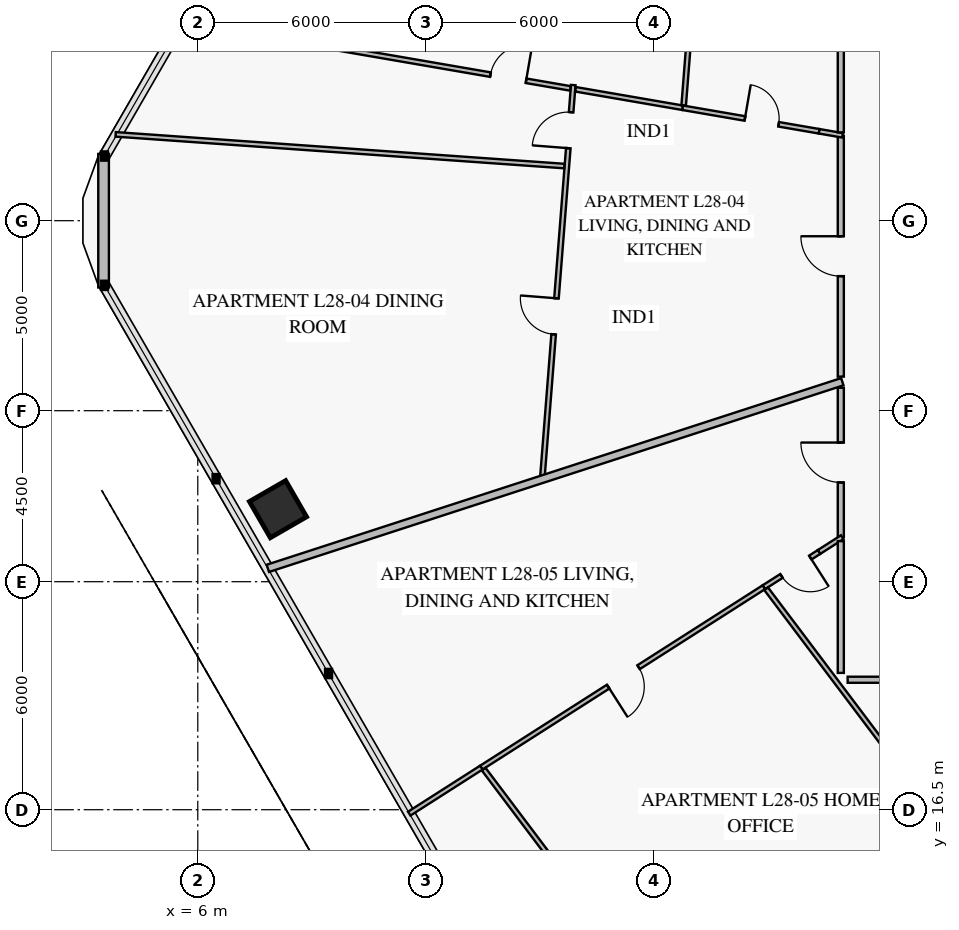
"""IFC4 building model, lengths in metres.
Left out: names, types, materials, properties, quantities, classifications, styles, units other than length and angle.
Written with IfcOpenShell. Run it as: python <this file> out.ifc"""

import sys

from ifc_helpers import new_model, si_unit, direction, frame, frame_2d, origin, origin_2d, place, context, subcontext, project, spatial, rectangle, extrude, element, fill, save


model = new_model("IFC4")
c1 = context("Model", 3, precision=1e-05, world=origin(), true_north=direction((0.0, 1.0)))
c2 = subcontext(c1, "Body", "Model", "MODEL_VIEW")
j1 = project(units=[si_unit("LENGTHUNIT", "METRE"), si_unit("PLANEANGLEUNIT", "RADIAN")], contexts=[c1])
p1 = place(None, origin())
s1 = spatial("IfcSite", under=j1, at=p1, CompositionType="ELEMENT")
p2 = place(p1, origin())
s2 = spatial("IfcBuilding", under=s1, at=p2, CompositionType="ELEMENT")
p3 = place(p2, frame((0.0, 0.0, 115.2)))
s3 = spatial("IfcBuildingStorey", under=s2, at=p3, CompositionType="ELEMENT", Elevation=115.2)
p4 = place(p3, frame((8.111, 24.408, 0.0), z_axis=(0.0, 0.0, 1.0), x_axis=(0.5, -0.866025403784, 0.0)))
e1 = element("IfcColumn", 1, at=p4, inside=s3, PredefinedType="COLUMN", context=c2, shape_type="SweptSolid", body=[
    extrude(rectangle(XDim=1.1, YDim=1.1, at=origin_2d()), origin(), (0.0, 0.0, 1.0), 3.55),
])
p5 = place(p3, frame((3.521, 30.242, 0.0), z_axis=(0.0, 0.0, 1.0), x_axis=(0.0, 1.0, 0.0)))
e2 = element("IfcWall", 2, at=p5, inside=s3, PredefinedType="SOLIDWALL", context=c2, shape_type="SweptSolid", body=[
    extrude(rectangle(XDim=3.515, YDim=0.28, at=frame_2d((1.758, 0.0))), origin(), (0.0, 0.0, 1.0), 3.55),
])
p6 = place(p3, frame((15.88, 35.57, 0.0), z_axis=(0.0, 0.0, 1.0), x_axis=(-0.078466415581, -0.996916757621, 0.0)))
e3 = element("IfcWall", 3, at=p6, inside=s3, PredefinedType="PARTITIONING", context=c2, shape_type="SweptSolid", body=[
    extrude(rectangle(XDim=10.305, YDim=0.12, at=frame_2d((5.152, 0.0))), origin(), (0.0, 0.0, 1.0), 2.85),
])
p7 = place(p6, frame((0.717, 0.0, 0.0)))
e4 = element("IfcOpeningElement", 4, at=p7, cuts=e3, PredefinedType="OPENING", context=c2, shape_type="SweptSolid", body=[
    extrude(rectangle(XDim=0.95, YDim=2.1, at=frame_2d((0.475, 1.05))), frame((0.0, 0.072, 0.0), z_axis=(0.0, -1.0, 0.0), x_axis=(1.0, 0.0, 0.0)), (0.0, 0.0, 1.0), 0.144),
])
p8 = place(p6, frame((5.629, 0.0, 0.0)))
e5 = element("IfcOpeningElement", 5, at=p8, cuts=e3, PredefinedType="OPENING", context=c2, shape_type="SweptSolid", body=[
    extrude(rectangle(XDim=0.95, YDim=2.1, at=frame_2d((0.475, 1.05))), frame((0.0, 0.072, 0.0), z_axis=(0.0, -1.0, 0.0), x_axis=(1.0, 0.0, 0.0)), (0.0, 0.0, 1.0), 0.144),
])
p9 = place(p3, frame((22.35, 34.353, 0.0), z_axis=(0.0, 0.0, 1.0), x_axis=(-0.985463207412, 0.169888983862, 0.0)))
e6 = element("IfcWall", 6, at=p9, inside=s3, PredefinedType="PARTITIONING", context=c2, shape_type="SweptSolid", body=[
    extrude(rectangle(XDim=3.647, YDim=0.12, at=frame_2d((1.824, 0.0))), origin(), (0.0, 0.0, 1.0), 3.55),
])
p10 = place(p9, frame((1.082, 0.0, 0.0)))
e7 = element("IfcOpeningElement", 7, at=p10, cuts=e6, PredefinedType="OPENING", context=c2, shape_type="SweptSolid", body=[
    extrude(rectangle(XDim=0.9, YDim=2.1, at=frame_2d((0.45, 1.05))), frame((0.0, 0.072, 0.0), z_axis=(0.0, -1.0, 0.0), x_axis=(1.0, 0.0, 0.0)), (0.0, 0.0, 1.0), 0.144),
])
p11 = place(p3, frame((18.756, 34.972, 0.0), z_axis=(0.0, 0.0, 1.0), x_axis=(-0.985473922691, 0.169826816774, 0.0)))
e8 = element("IfcWall", 8, at=p11, inside=s3, PredefinedType="PARTITIONING", context=c2, shape_type="SweptSolid", body=[
    extrude(rectangle(XDim=2.858, YDim=0.12, at=frame_2d((1.429, 0.0))), origin(), (0.0, 0.0, 1.0), 3.1),
])
p12 = place(p3, frame((15.805, 35.481, 0.0), z_axis=(0.0, 0.0, 1.0), x_axis=(-0.985468091592, 0.169860650105, 0.0)))
e9 = element("IfcWall", 9, at=p12, inside=s3, PredefinedType="PARTITIONING", context=c2, shape_type="SweptSolid", body=[
    extrude(rectangle(XDim=6.362, YDim=0.12, at=frame_2d((3.181, 0.0))), origin(), (0.0, 0.0, 1.0), 3.55),
])
p13 = place(p12, frame((1.184, 0.0, 0.0)))
e10 = element("IfcOpeningElement", 10, at=p13, cuts=e9, PredefinedType="OPENING", context=c2, shape_type="SweptSolid", body=[
    extrude(rectangle(XDim=0.95, YDim=2.1, at=frame_2d((0.475, 1.05))), frame((0.0, 0.072, 0.0), z_axis=(0.0, -1.0, 0.0), x_axis=(1.0, 0.0, 0.0)), (0.0, 0.0, 1.0), 0.144),
])
p14 = place(p3, frame((22.92, 34.234, 0.0), z_axis=(0.0, 0.0, 1.0), x_axis=(0.0, -1.0, 0.0)))
e11 = element("IfcWall", 11, at=p14, inside=s3, PredefinedType="PARTITIONING", context=c2, shape_type="SweptSolid", body=[
    extrude(rectangle(XDim=6.337, YDim=0.16, at=frame_2d((3.169, 0.0))), origin(), (0.0, 0.0, 1.0), 2.85),
])
p15 = place(p14, frame((2.644, 0.0, 0.0)))
e12 = element("IfcOpeningElement", 12, at=p15, cuts=e11, PredefinedType="OPENING", context=c2, shape_type="SweptSolid", body=[
    extrude(rectangle(XDim=1.05, YDim=2.15, at=frame_2d((0.525, 1.075))), frame((0.0, 0.092, 0.0), z_axis=(0.0, -1.0, 0.0), x_axis=(1.0, 0.0, 0.0)), (0.0, 0.0, 1.0), 0.184),
])
p16 = place(p3, frame((22.35, 23.284, 0.0), z_axis=(0.0, 0.0, 1.0), x_axis=(-0.842804899484, -0.538219194572, 0.0)))
e13 = element("IfcWall", 13, at=p16, inside=s3, PredefinedType="PARTITIONING", context=c2, shape_type="SweptSolid", body=[
    extrude(rectangle(XDim=1.727, YDim=0.12, at=frame_2d((0.864, 0.0))), origin(), (0.0, 0.0, 1.0), 3.55),
])
p17 = place(p16, frame((0.275, 0.0, 0.0)))
e14 = element("IfcOpeningElement", 14, at=p17, cuts=e13, PredefinedType="OPENING", context=c2, shape_type="SweptSolid", body=[
    extrude(rectangle(XDim=0.9, YDim=2.1, at=frame_2d((0.45, 1.05))), frame((0.0, 0.072, 0.0), z_axis=(0.0, -1.0, 0.0), x_axis=(1.0, 0.0, 0.0)), (0.0, 0.0, 1.0), 0.144),
])
p18 = place(p3, frame((20.894, 22.354, 0.0), z_axis=(0.0, 0.0, 1.0), x_axis=(-0.842829505657, -0.538180661482, 0.0)))
e15 = element("IfcWall", 15, at=p18, inside=s3, PredefinedType="PARTITIONING", context=c2, shape_type="SweptSolid", body=[
    extrude(rectangle(XDim=8.819, YDim=0.12, at=frame_2d((4.41, 0.0))), origin(), (0.0, 0.0, 1.0), 3.1),
])
p19 = place(p18, frame((3.91, 0.0, 0.0)))
e16 = element("IfcOpeningElement", 16, at=p19, cuts=e15, PredefinedType="OPENING", context=c2, shape_type="SweptSolid", body=[
    extrude(rectangle(XDim=0.95, YDim=2.1, at=frame_2d((0.475, 1.05))), frame((0.0, 0.072, 0.0), z_axis=(0.0, -1.0, 0.0), x_axis=(1.0, 0.0, 0.0)), (0.0, 0.0, 1.0), 0.144),
])
p20 = place(p3, frame((13.523, 17.567, 0.0), z_axis=(0.0, 0.0, 1.0), x_axis=(0.601820745962, -0.798631197569, 0.0)))
e17 = element("IfcWall", 17, at=p20, inside=s3, PredefinedType="PARTITIONING", context=c2, shape_type="SweptSolid", body=[
    extrude(rectangle(XDim=11.018, YDim=0.12, at=frame_2d((5.509, 0.0))), origin(), (0.0, 0.0, 1.0), 2.8),
])
p21 = place(p20, frame((4.39, 0.0, 0.0)))
e18 = element("IfcOpeningElement", 18, at=p21, cuts=e17, PredefinedType="OPENING", context=c2, shape_type="SweptSolid", body=[
    extrude(rectangle(XDim=0.95, YDim=2.1, at=frame_2d((0.475, 1.05))), frame((0.0, 0.072, 0.0), z_axis=(0.0, -1.0, 0.0), x_axis=(1.0, 0.0, 0.0)), (0.0, 0.0, 1.0), 0.144),
])
p22 = place(p3, frame((22.92, 27.602, 0.0), z_axis=(0.0, 0.0, 1.0), x_axis=(0.0, -1.0, 0.0)))
e19 = element("IfcWall", 19, at=p22, inside=s3, PredefinedType="PARTITIONING", context=c2, shape_type="SweptSolid", body=[
    extrude(rectangle(XDim=3.931, YDim=0.16, at=frame_2d((1.965, 0.0))), origin(), (0.0, 0.0, 1.0), 3.55),
])
p23 = place(p22, frame((1.44, 0.0, 0.0)))
e20 = element("IfcOpeningElement", 20, at=p23, cuts=e19, PredefinedType="OPENING", context=c2, shape_type="SweptSolid", body=[
    extrude(rectangle(XDim=1.05, YDim=2.15, at=frame_2d((0.525, 1.075))), frame((0.0, 0.092, 0.0), z_axis=(0.0, -1.0, 0.0), x_axis=(1.0, 0.0, 0.0)), (0.0, 0.0, 1.0), 0.184),
])
p24 = place(p3, frame((15.644, 33.438, 0.0), z_axis=(0.0, 0.0, 1.0), x_axis=(-0.997515449917, 0.070448045941, 0.0)))
e21 = element("IfcWall", 21, at=p24, inside=s3, PredefinedType="PARTITIONING", context=c2, shape_type="SweptSolid", body=[
    extrude(rectangle(XDim=11.835, YDim=0.12, at=frame_2d((5.917, 0.0))), origin(), (0.0, 0.0, 1.0), 2.8),
])
p25 = place(p3, frame((22.965, 34.247, 0.0), z_axis=(0.0, 0.0, 1.0), x_axis=(-0.985457855144, 0.169920027466, 0.0)))
e22 = element("IfcWall", 22, at=p25, inside=s3, PredefinedType="PARTITIONING", context=c2, shape_type="SweptSolid", body=[
    extrude(rectangle(XDim=0.624, YDim=0.12, at=frame_2d((0.312, 0.0))), origin(), (0.0, 0.0, 1.0), 3.55),
])
p26 = place(p3, frame((19.211, 40.433, 0.0), z_axis=(0.0, 0.0, 1.0), x_axis=(-0.078465431449, -0.996916835081, 0.0)))
e23 = element("IfcWall", 23, at=p26, inside=s3, PredefinedType="PARTITIONING", context=c2, shape_type="SweptSolid", body=[
    extrude(rectangle(XDim=5.414, YDim=0.12, at=frame_2d((2.707, 0.0))), origin(), (0.0, 0.0, 1.0), 2.85),
])
p27 = place(p3, frame((22.96, 27.763, 0.0), z_axis=(0.0, 0.0, 1.0), x_axis=(-0.95105675479, -0.309016260362, 0.0)))
e24 = element("IfcWall", 24, at=p27, inside=s3, PredefinedType="PARTITIONING", context=c2, shape_type="SweptSolid", body=[
    extrude(rectangle(XDim=15.894, YDim=0.2, at=frame_2d((7.947, 0.0))), origin(), (0.0, 0.0, 1.0), 2.8),
])
p28 = place(p3, frame((22.957, 23.672, 0.0), z_axis=(0.0, 0.0, 1.0), x_axis=(-0.842837175005, -0.538168650546, 0.0)))
e25 = element("IfcWall", 25, at=p28, inside=s3, PredefinedType="PARTITIONING", context=c2, shape_type="SweptSolid", body=[
    extrude(rectangle(XDim=0.72, YDim=0.12, at=frame_2d((0.36, 0.0))), origin(), (0.0, 0.0, 1.0), 3.55),
])
p29 = place(p3, frame((13.461, 17.608, 0.0), z_axis=(0.0, 0.0, 1.0), x_axis=(-0.842820653361, -0.538194524562, 0.0)))
e26 = element("IfcWall", 26, at=p29, inside=s3, PredefinedType="PARTITIONING", context=c2, shape_type="SweptSolid", body=[
    extrude(rectangle(XDim=2.25, YDim=0.12, at=frame_2d((1.125, 0.0))), origin(), (0.0, 0.0, 1.0), 2.8),
])
p30 = place(p3, frame((20.956, 22.313, 0.0), z_axis=(0.0, 0.0, 1.0), x_axis=(0.601821242671, -0.798630823265, 0.0)))
e27 = element("IfcWall", 27, at=p30, inside=s3, PredefinedType="PARTITIONING", context=c2, shape_type="SweptSolid", body=[
    extrude(rectangle(XDim=7.393, YDim=0.12, at=frame_2d((3.697, 0.0))), origin(), (0.0, 0.0, 1.0), 2.85),
])
p31 = place(p3, frame((27.879, 19.96, 0.0), z_axis=(0.0, 0.0, 1.0), x_axis=(-0.559197020648, -0.829034795469, 0.0)))
e28 = element("IfcWall", 28, at=p31, inside=s3, PredefinedType="PARTITIONING", context=c2, shape_type="SweptSolid", body=[
    extrude(rectangle(XDim=17.696, YDim=0.2, at=frame_2d((8.848, 0.0))), origin(), (0.0, 0.0, 1.0), 2.8),
])
p32 = place(p3, frame((22.92, 38.499, 0.0), z_axis=(0.0, 0.0, 1.0), x_axis=(0.0, -1.0, 0.0)))
e29 = element("IfcWall", 29, at=p32, inside=s3, PredefinedType="PARTITIONING", context=c2, shape_type="SweptSolid", body=[
    extrude(rectangle(XDim=4.176, YDim=0.16, at=frame_2d((2.088, 0.0))), origin(), (0.0, 0.0, 1.0), 2.85),
])
p33 = place(p3, frame((23.1, 19.92, 0.0), z_axis=(0.0, 0.0, 1.0), x_axis=(1.0, 0.0, 0.0)))
e30 = element("IfcWall", 30, at=p33, inside=s3, PredefinedType="PARTITIONING", context=c2, shape_type="SweptSolid", body=[
    extrude(rectangle(XDim=4.573, YDim=0.16, at=frame_2d((2.287, 0.0))), origin(), (0.0, 0.0, 1.0), 2.85),
])
p34 = place(p3, frame((22.92, 23.567, 0.0), z_axis=(0.0, 0.0, 1.0), x_axis=(0.0, -1.0, 0.0)))
e31 = element("IfcWall", 31, at=p34, inside=s3, PredefinedType="PARTITIONING", context=c2, shape_type="SweptSolid", body=[
    extrude(rectangle(XDim=3.467, YDim=0.16, at=frame_2d((1.733, 0.0))), origin(), (0.0, 0.0, 1.0), 3.55),
])
p35 = place(p7, frame((0.95, 0.0, 0.0), z_axis=(0.0, 0.0, 1.0), x_axis=(-1.0, 0.0, 0.0)))
e32 = element("IfcDoor", 32, at=p35, inside=s3, OperationType="SINGLE_SWING_LEFT", PredefinedType="DOOR", context=c2, shape_type="SweptSolid", body=[
    extrude(rectangle(XDim=0.95, YDim=2.1, at=frame_2d((0.475, 1.05))), frame((0.0, 0.025, 0.0), z_axis=(0.0, -1.0, 0.0), x_axis=(1.0, 0.0, 0.0)), (0.0, 0.0, 1.0), 0.05),
])
fill(e4, e32)
p36 = place(p8, frame((0.95, 0.0, 0.0), z_axis=(0.0, 0.0, 1.0), x_axis=(-1.0, 0.0, 0.0)))
e33 = element("IfcDoor", 33, at=p36, inside=s3, OperationType="SINGLE_SWING_RIGHT", PredefinedType="DOOR", context=c2, shape_type="SweptSolid", body=[
    extrude(rectangle(XDim=0.95, YDim=2.1, at=frame_2d((0.475, 1.05))), frame((0.0, 0.025, 0.0), z_axis=(0.0, -1.0, 0.0), x_axis=(1.0, 0.0, 0.0)), (0.0, 0.0, 1.0), 0.05),
])
fill(e5, e33)
p37 = place(p10, frame((0.9, 0.0, 0.0), z_axis=(0.0, 0.0, 1.0), x_axis=(-1.0, 0.0, 0.0)))
e34 = element("IfcDoor", 34, at=p37, inside=s3, OperationType="SINGLE_SWING_LEFT", PredefinedType="DOOR", context=c2, shape_type="SweptSolid", body=[
    extrude(rectangle(XDim=0.9, YDim=2.1, at=frame_2d((0.45, 1.05))), frame((0.0, 0.025, 0.0), z_axis=(0.0, -1.0, 0.0), x_axis=(1.0, 0.0, 0.0)), (0.0, 0.0, 1.0), 0.05),
])
fill(e7, e34)
p38 = place(p13, frame((0.95, 0.0, 0.0), z_axis=(0.0, 0.0, 1.0), x_axis=(-1.0, 0.0, 0.0)))
e35 = element("IfcDoor", 35, at=p38, inside=s3, OperationType="SINGLE_SWING_RIGHT", PredefinedType="DOOR", context=c2, shape_type="SweptSolid", body=[
    extrude(rectangle(XDim=0.95, YDim=2.1, at=frame_2d((0.475, 1.05))), frame((0.0, 0.025, 0.0), z_axis=(0.0, -1.0, 0.0), x_axis=(1.0, 0.0, 0.0)), (0.0, 0.0, 1.0), 0.05),
])
fill(e10, e35)
p39 = place(p15, frame((1.05, 0.0, 0.0), z_axis=(0.0, 0.0, 1.0), x_axis=(-1.0, 0.0, 0.0)))
e36 = element("IfcDoor", 36, at=p39, inside=s3, OperationType="SINGLE_SWING_RIGHT", PredefinedType="DOOR", context=c2, shape_type="SweptSolid", body=[
    extrude(rectangle(XDim=1.05, YDim=2.15, at=frame_2d((0.525, 1.075))), frame((0.0, 0.025, 0.0), z_axis=(0.0, -1.0, 0.0), x_axis=(1.0, 0.0, 0.0)), (0.0, 0.0, 1.0), 0.05),
])
fill(e12, e36)
p40 = place(p17, origin())
e37 = element("IfcDoor", 37, at=p40, inside=s3, OperationType="SINGLE_SWING_LEFT", PredefinedType="DOOR", context=c2, shape_type="SweptSolid", body=[
    extrude(rectangle(XDim=0.9, YDim=2.1, at=frame_2d((0.45, 1.05))), frame((0.0, 0.025, 0.0), z_axis=(0.0, -1.0, 0.0), x_axis=(1.0, 0.0, 0.0)), (0.0, 0.0, 1.0), 0.05),
])
fill(e14, e37)
p41 = place(p19, origin())
e38 = element("IfcDoor", 38, at=p41, inside=s3, OperationType="SINGLE_SWING_RIGHT", PredefinedType="DOOR", context=c2, shape_type="SweptSolid", body=[
    extrude(rectangle(XDim=0.95, YDim=2.1, at=frame_2d((0.475, 1.05))), frame((0.0, 0.025, 0.0), z_axis=(0.0, -1.0, 0.0), x_axis=(1.0, 0.0, 0.0)), (0.0, 0.0, 1.0), 0.05),
])
fill(e16, e38)
p42 = place(p23, frame((1.05, 0.0, 0.0), z_axis=(0.0, 0.0, 1.0), x_axis=(-1.0, 0.0, 0.0)))
e39 = element("IfcDoor", 39, at=p42, inside=s3, OperationType="SINGLE_SWING_RIGHT", PredefinedType="DOOR", context=c2, shape_type="SweptSolid", body=[
    extrude(rectangle(XDim=1.05, YDim=2.15, at=frame_2d((0.525, 1.075))), frame((0.0, 0.025, 0.0), z_axis=(0.0, -1.0, 0.0), x_axis=(1.0, 0.0, 0.0)), (0.0, 0.0, 1.0), 0.05),
])
fill(e20, e39)
save(model, sys.argv[1])
